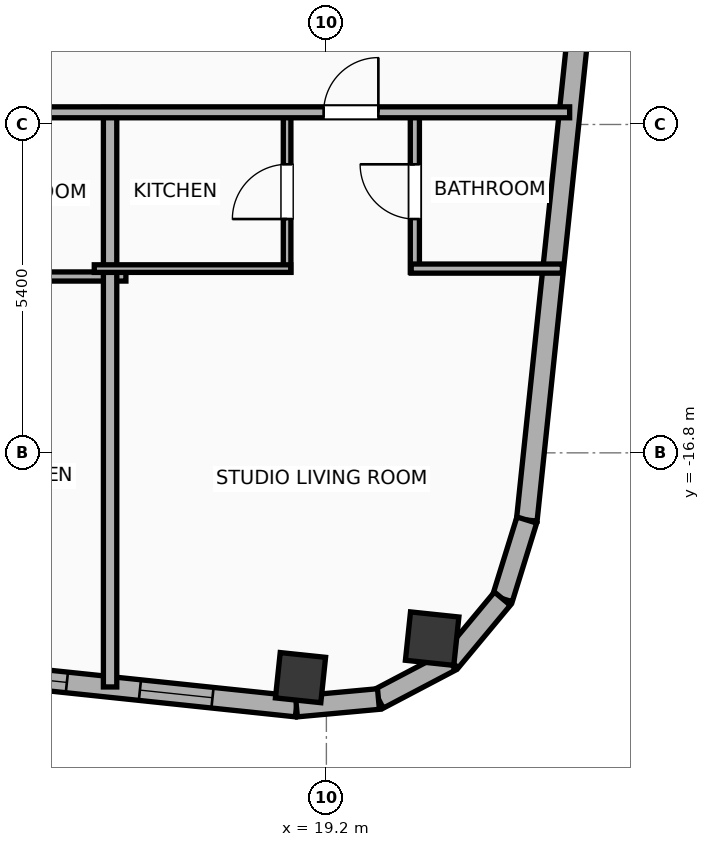
"""IFC4 building model, lengths in metres.
Left out: names, types, materials, properties, quantities, classifications, styles, units other than length and angle.
Written with IfcOpenShell. Run it as: python <this file> out.ifc"""

import sys

from ifc_helpers import new_model, si_unit, direction, frame, frame_2d, origin, origin_2d, place, context, subcontext, project, spatial, rectangle, hollow_rectangle, hollow_circle, extrude, element, fill, save


model = new_model("IFC4")
c1 = context("Model", 3, precision=1e-05, world=origin(), true_north=direction((0.0, 1.0)))
c2 = subcontext(c1, "Body", "Model", "MODEL_VIEW")
j1 = project(units=[si_unit("LENGTHUNIT", "METRE"), si_unit("PLANEANGLEUNIT", "RADIAN")], contexts=[c1])
p1 = place(None, origin())
s1 = spatial("IfcSite", under=j1, at=p1, CompositionType="ELEMENT")
p2 = place(p1, origin())
s2 = spatial("IfcBuilding", under=s1, at=p2, CompositionType="ELEMENT")
p3 = place(p2, frame((0.0, 0.0, 287.3)))
s3 = spatial("IfcBuildingStorey", under=s2, at=p3, CompositionType="ELEMENT", Elevation=287.3)
p4 = place(p3, frame((18.775, -20.497, 0.0), z_axis=(0.0, 0.0, 1.0), x_axis=(0.994521895368, -0.104528463268, 0.0)))
e1 = element("IfcColumn", 1, at=p4, inside=s3, PredefinedType="COLUMN", context=c2, shape_type="SweptSolid", body=[
    extrude(hollow_rectangle(XDim=0.75, YDim=0.75, WallThickness=0.025, at=origin_2d()), origin(), (0.0, 0.0, 1.0), 3.9),
])
p5 = place(p3, frame((20.939, -19.855, 0.0), z_axis=(0.0, 0.0, 1.0), x_axis=(0.994521895368, -0.104528463268, 0.0)))
e2 = element("IfcColumn", 2, at=p5, inside=s3, PredefinedType="COLUMN", context=c2, shape_type="SweptSolid", body=[
    extrude(hollow_circle(Radius=0.4, WallThickness=0.028, at=origin_2d()), origin(), (0.0, 0.0, 1.0), 3.9),
])
p6 = place(p3, frame((18.708, -20.972, 0.0), z_axis=(0.0, 0.0, 1.0), x_axis=(-0.994521888554, 0.104528528102, 0.0)))
e3 = element("IfcWall", 3, at=p6, inside=s3, PredefinedType="ELEMENTEDWALL", context=c2, shape_type="SweptSolid", body=[
    extrude(rectangle(XDim=46.766, YDim=0.34, at=frame_2d((23.383, 0.0))), origin(), (0.0, 0.0, 1.0), 3.635),
])
p7 = place(p6, frame((23.833, 0.0, 0.75)))
e4 = element("IfcOpeningElement", 4, at=p7, cuts=e3, PredefinedType="OPENING", context=c2, shape_type="SweptSolid", body=[
    extrude(rectangle(XDim=2.4, YDim=2.1, at=frame_2d((1.2, 1.05))), frame((0.0, 0.18, 0.0), z_axis=(0.0, -1.0, 0.0), x_axis=(1.0, 0.0, 0.0)), (0.0, 0.0, 1.0), 0.36),
])
p8 = place(p6, frame((38.622, 0.0, 0.75)))
e5 = element("IfcOpeningElement", 5, at=p8, cuts=e3, PredefinedType="OPENING", context=c2, shape_type="SweptSolid", body=[
    extrude(rectangle(XDim=2.4, YDim=2.1, at=frame_2d((1.2, 1.05))), frame((0.0, 0.18, 0.0), z_axis=(0.0, -1.0, 0.0), x_axis=(1.0, 0.0, 0.0)), (0.0, 0.0, 1.0), 0.36),
])
p9 = place(p6, frame((44.402, 0.0, 0.75)))
e6 = element("IfcOpeningElement", 6, at=p9, cuts=e3, PredefinedType="OPENING", context=c2, shape_type="SweptSolid", body=[
    extrude(rectangle(XDim=1.2, YDim=2.05, at=frame_2d((0.6, 1.025))), frame((0.0, 0.18, 0.0), z_axis=(0.0, -1.0, 0.0), x_axis=(1.0, 0.0, 0.0)), (0.0, 0.0, 1.0), 0.36),
])
p10 = place(p6, frame((42.358, 0.0, 0.75)))
e7 = element("IfcOpeningElement", 7, at=p10, cuts=e3, PredefinedType="OPENING", context=c2, shape_type="SweptSolid", body=[
    extrude(rectangle(XDim=1.2, YDim=2.05, at=frame_2d((0.6, 1.025))), frame((0.0, 0.18, 0.0), z_axis=(0.0, -1.0, 0.0), x_axis=(1.0, 0.0, 0.0)), (0.0, 0.0, 1.0), 0.36),
])
p11 = place(p6, frame((34.933, 0.0, 0.75)))
e8 = element("IfcOpeningElement", 8, at=p11, cuts=e3, PredefinedType="OPENING", context=c2, shape_type="SweptSolid", body=[
    extrude(rectangle(XDim=1.2, YDim=2.05, at=frame_2d((0.6, 1.025))), frame((0.0, 0.18, 0.0), z_axis=(0.0, -1.0, 0.0), x_axis=(1.0, 0.0, 0.0)), (0.0, 0.0, 1.0), 0.36),
])
p12 = place(p6, frame((28.704, 0.0, 0.75)))
e9 = element("IfcOpeningElement", 9, at=p12, cuts=e3, PredefinedType="OPENING", context=c2, shape_type="SweptSolid", body=[
    extrude(rectangle(XDim=1.2, YDim=2.05, at=frame_2d((0.6, 1.025))), frame((0.0, 0.18, 0.0), z_axis=(0.0, -1.0, 0.0), x_axis=(1.0, 0.0, 0.0)), (0.0, 0.0, 1.0), 0.36),
])
p13 = place(p6, frame((30.849, 0.0, 0.75)))
e10 = element("IfcOpeningElement", 10, at=p13, cuts=e3, PredefinedType="OPENING", context=c2, shape_type="SweptSolid", body=[
    extrude(rectangle(XDim=1.2, YDim=2.05, at=frame_2d((0.6, 1.025))), frame((0.0, 0.18, 0.0), z_axis=(0.0, -1.0, 0.0), x_axis=(1.0, 0.0, 0.0)), (0.0, 0.0, 1.0), 0.36),
])
p14 = place(p6, frame((7.479, 0.0, 0.75)))
e11 = element("IfcOpeningElement", 11, at=p14, cuts=e3, PredefinedType="OPENING", context=c2, shape_type="SweptSolid", body=[
    extrude(rectangle(XDim=1.2, YDim=2.05, at=frame_2d((0.6, 1.025))), frame((0.0, 0.18, 0.0), z_axis=(0.0, -1.0, 0.0), x_axis=(1.0, 0.0, 0.0)), (0.0, 0.0, 1.0), 0.36),
])
p15 = place(p6, frame((3.796, 0.0, 0.75)))
e12 = element("IfcOpeningElement", 12, at=p15, cuts=e3, PredefinedType="OPENING", context=c2, shape_type="SweptSolid", body=[
    extrude(rectangle(XDim=1.2, YDim=2.05, at=frame_2d((0.6, 1.025))), frame((0.0, 0.18, 0.0), z_axis=(0.0, -1.0, 0.0), x_axis=(1.0, 0.0, 0.0)), (0.0, 0.0, 1.0), 0.36),
])
p16 = place(p6, frame((1.388, 0.0, 0.75)))
e13 = element("IfcOpeningElement", 13, at=p16, cuts=e3, PredefinedType="OPENING", context=c2, shape_type="SweptSolid", body=[
    extrude(rectangle(XDim=1.2, YDim=2.05, at=frame_2d((0.6, 1.025))), frame((0.0, 0.18, 0.0), z_axis=(0.0, -1.0, 0.0), x_axis=(1.0, 0.0, 0.0)), (0.0, 0.0, 1.0), 0.36),
])
p17 = place(p6, frame((20.254, 0.0, 0.75)))
e14 = element("IfcOpeningElement", 14, at=p17, cuts=e3, PredefinedType="OPENING", context=c2, shape_type="SweptSolid", body=[
    extrude(rectangle(XDim=1.2, YDim=2.05, at=frame_2d((0.6, 1.025))), frame((0.0, 0.18, 0.0), z_axis=(0.0, -1.0, 0.0), x_axis=(1.0, 0.0, 0.0)), (0.0, 0.0, 1.0), 0.36),
])
p18 = place(p6, frame((16.172, 0.0, 0.75)))
e15 = element("IfcOpeningElement", 15, at=p18, cuts=e3, PredefinedType="OPENING", context=c2, shape_type="SweptSolid", body=[
    extrude(rectangle(XDim=1.2, YDim=2.05, at=frame_2d((0.6, 1.025))), frame((0.0, 0.18, 0.0), z_axis=(0.0, -1.0, 0.0), x_axis=(1.0, 0.0, 0.0)), (0.0, 0.0, 1.0), 0.36),
])
p19 = place(p6, frame((12.11, 0.0, 0.75)))
e16 = element("IfcOpeningElement", 16, at=p19, cuts=e3, PredefinedType="OPENING", context=c2, shape_type="SweptSolid", body=[
    extrude(rectangle(XDim=1.2, YDim=2.05, at=frame_2d((0.6, 1.025))), frame((0.0, 0.18, 0.0), z_axis=(0.0, -1.0, 0.0), x_axis=(1.0, 0.0, 0.0)), (0.0, 0.0, 1.0), 0.36),
])
p20 = place(p3, frame((25.67, 12.296, 0.0), z_axis=(0.0, 0.0, 1.0), x_axis=(-0.104533282919, -0.994521388791, 0.0)))
e17 = element("IfcWall", 17, at=p20, inside=s3, PredefinedType="ELEMENTEDWALL", context=c2, shape_type="SweptSolid", body=[
    extrude(rectangle(XDim=30.366, YDim=0.34, at=frame_2d((15.183, 0.0))), origin(), (0.0, 0.0, 1.0), 3.635),
])
p21 = place(p20, frame((5.842, 0.0, 0.75)))
e18 = element("IfcOpeningElement", 18, at=p21, cuts=e17, PredefinedType="OPENING", context=c2, shape_type="SweptSolid", body=[
    extrude(rectangle(XDim=1.8, YDim=2.1, at=frame_2d((0.9, 1.05))), frame((0.0, 0.18, 0.0), z_axis=(0.0, -1.0, 0.0), x_axis=(1.0, 0.0, 0.0)), (0.0, 0.0, 1.0), 0.36),
])
p22 = place(p20, frame((18.382, 0.0, 0.75)))
e19 = element("IfcOpeningElement", 19, at=p22, cuts=e17, PredefinedType="OPENING", context=c2, shape_type="SweptSolid", body=[
    extrude(rectangle(XDim=1.2, YDim=2.05, at=frame_2d((0.6, 1.025))), frame((0.0, 0.18, 0.0), z_axis=(0.0, -1.0, 0.0), x_axis=(1.0, 0.0, 0.0)), (0.0, 0.0, 1.0), 0.36),
])
p23 = place(p3, frame((22.496, -17.905, 0.0), z_axis=(0.0, 0.0, 1.0), x_axis=(-0.296416228123, -0.955058856671, 0.0)))
e20 = element("IfcWall", 20, at=p23, inside=s3, PredefinedType="ELEMENTEDWALL", context=c2, shape_type="SweptSolid", body=[
    extrude(rectangle(XDim=1.354, YDim=0.34, at=frame_2d((0.677, 0.0))), origin(), (0.0, 0.0, 1.0), 3.635),
])
p24 = place(p3, frame((22.094, -19.198, 0.0), z_axis=(0.0, 0.0, 1.0), x_axis=(-0.639501603217, -0.768789762863, 0.0)))
e21 = element("IfcWall", 21, at=p24, inside=s3, PredefinedType="ELEMENTEDWALL", context=c2, shape_type="SweptSolid", body=[
    extrude(rectangle(XDim=1.337, YDim=0.34, at=frame_2d((0.668, 0.0))), origin(), (0.0, 0.0, 1.0), 3.635),
])
p25 = place(p3, frame((21.24, -20.226, 0.0), z_axis=(0.0, 0.0, 1.0), x_axis=(-0.884922182678, -0.465738908193, 0.0)))
e22 = element("IfcWall", 22, at=p25, inside=s3, PredefinedType="ELEMENTEDWALL", context=c2, shape_type="SweptSolid", body=[
    extrude(rectangle(XDim=1.337, YDim=0.34, at=frame_2d((0.668, 0.0))), origin(), (0.0, 0.0, 1.0), 3.635),
])
p26 = place(p3, frame((20.056, -20.848, 0.0), z_axis=(0.0, 0.0, 1.0), x_axis=(-0.995813013343, -0.091413579172, 0.0)))
e23 = element("IfcWall", 23, at=p26, inside=s3, PredefinedType="ELEMENTEDWALL", context=c2, shape_type="SweptSolid", body=[
    extrude(rectangle(XDim=1.354, YDim=0.34, at=frame_2d((0.677, 0.0))), origin(), (0.0, 0.0, 1.0), 3.635),
])
p27 = place(p3, frame((12.953, -13.9, 0.0), z_axis=(0.0, 0.0, 1.0), x_axis=(1.0, 0.0, 0.0)))
e24 = element("IfcWall", 24, at=p27, inside=s3, PredefinedType="PLUMBINGWALL", context=c2, shape_type="SweptSolid", body=[
    extrude(rectangle(XDim=2.95, YDim=0.15, at=frame_2d((1.475, 0.0))), origin(), (0.0, 0.0, 1.0), 3.635),
])
p28 = place(p3, frame((15.643, -20.65, 0.0), z_axis=(0.0, 0.0, 1.0), x_axis=(0.0, 1.0, 0.0)))
e25 = element("IfcWall", 25, at=p28, inside=s3, PredefinedType="PARTITIONING", context=c2, shape_type="SweptSolid", body=[
    extrude(rectangle(XDim=9.53, YDim=0.22, at=frame_2d((4.765, 0.0))), origin(), (0.0, 0.0, 1.0), 3.635),
])
p29 = place(p3, frame((18.554, -13.83, 0.0), z_axis=(0.0, 0.0, 1.0), x_axis=(0.0, 1.0, 0.0)))
e26 = element("IfcWall", 26, at=p29, inside=s3, PredefinedType="PARTITIONING", context=c2, shape_type="SweptSolid", body=[
    extrude(rectangle(XDim=2.65, YDim=0.125, at=frame_2d((1.325, 0.0))), origin(), (0.0, 0.0, 1.0), 3.635),
])
p30 = place(p29, frame((0.875, 0.0, 0.0)))
e27 = element("IfcOpeningElement", 27, at=p30, cuts=e26, PredefinedType="OPENING", context=c2, shape_type="SweptSolid", body=[
    extrude(rectangle(XDim=0.9, YDim=2.05, at=frame_2d((0.45, 1.025))), frame((0.0, 0.073, 0.0), z_axis=(0.0, -1.0, 0.0), x_axis=(1.0, 0.0, 0.0)), (0.0, 0.0, 1.0), 0.145),
])
p31 = place(p3, frame((20.655, -13.83, 0.0), z_axis=(0.0, 0.0, 1.0), x_axis=(0.0, 1.0, 0.0)))
e28 = element("IfcWall", 28, at=p31, inside=s3, PredefinedType="PLUMBINGWALL", context=c2, shape_type="SweptSolid", body=[
    extrude(rectangle(XDim=2.65, YDim=0.15, at=frame_2d((1.325, 0.0))), origin(), (0.0, 0.0, 1.0), 3.635),
])
p32 = place(p31, frame((0.875, 0.0, 0.0)))
e29 = element("IfcOpeningElement", 29, at=p32, cuts=e28, PredefinedType="OPENING", context=c2, shape_type="SweptSolid", body=[
    extrude(rectangle(XDim=0.9, YDim=2.05, at=frame_2d((0.45, 1.025))), frame((0.0, 0.085, 0.0), z_axis=(0.0, -1.0, 0.0), x_axis=(1.0, 0.0, 0.0)), (0.0, 0.0, 1.0), 0.17),
])
p33 = place(p3, frame((15.383, -13.77, 0.0), z_axis=(0.0, 0.0, 1.0), x_axis=(1.0, 0.0, 0.0)))
e30 = element("IfcWall", 30, at=p33, inside=s3, PredefinedType="PARTITIONING", context=c2, shape_type="SweptSolid", body=[
    extrude(rectangle(XDim=3.231, YDim=0.125, at=frame_2d((1.615, 0.0))), origin(), (0.0, 0.0, 1.0), 3.635),
])
p34 = place(p3, frame((20.595, -13.77, 0.0), z_axis=(0.0, 0.0, 1.0), x_axis=(1.0, 0.0, 0.0)))
e31 = element("IfcWall", 31, at=p34, inside=s3, PredefinedType="PLUMBINGWALL", context=c2, shape_type="SweptSolid", body=[
    extrude(rectangle(XDim=2.486, YDim=0.15, at=frame_2d((1.243, 0.0))), origin(), (0.0, 0.0, 1.0), 3.635),
])
p35 = place(p3, frame((8.08, -11.2, 0.0), z_axis=(0.0, 0.0, 1.0), x_axis=(1.0, 0.0, 0.0)))
e32 = element("IfcWall", 32, at=p35, inside=s3, PredefinedType="PARTITIONING", context=c2, shape_type="SweptSolid", body=[
    extrude(rectangle(XDim=15.121, YDim=0.18, at=frame_2d((7.56, 0.0))), origin(), (0.0, 0.0, 1.0), 3.635),
])
p36 = place(p35, frame((1.932, 0.0, 0.0)))
e33 = element("IfcOpeningElement", 33, at=p36, cuts=e32, PredefinedType="OPENING", context=c2, shape_type="SweptSolid", body=[
    extrude(rectangle(XDim=1.15, YDim=2.05, at=frame_2d((0.575, 1.025))), frame((0.0, 0.1, 0.0), z_axis=(0.0, -1.0, 0.0), x_axis=(1.0, 0.0, 0.0)), (0.0, 0.0, 1.0), 0.2),
])
p37 = place(p35, frame((11.075, 0.0, 0.0)))
e34 = element("IfcOpeningElement", 34, at=p37, cuts=e32, PredefinedType="OPENING", context=c2, shape_type="SweptSolid", body=[
    extrude(rectangle(XDim=0.9, YDim=2.05, at=frame_2d((0.45, 1.025))), frame((0.0, 0.1, 0.0), z_axis=(0.0, -1.0, 0.0), x_axis=(1.0, 0.0, 0.0)), (0.0, 0.0, 1.0), 0.2),
])
p38 = place(p15, origin())
e35 = element("IfcWindow", 35, at=p38, inside=s3, PartitioningType="SINGLE_PANEL", PredefinedType="WINDOW", context=c2, shape_type="SweptSolid", body=[
    extrude(rectangle(XDim=1.2, YDim=2.05, at=frame_2d((0.6, 1.025))), frame((0.0, 0.03, 0.0), z_axis=(0.0, -1.0, 0.0), x_axis=(1.0, 0.0, 0.0)), (0.0, 0.0, 1.0), 0.06),
])
fill(e12, e35)
p39 = place(p16, origin())
e36 = element("IfcWindow", 36, at=p39, inside=s3, PartitioningType="SINGLE_PANEL", PredefinedType="WINDOW", context=c2, shape_type="SweptSolid", body=[
    extrude(rectangle(XDim=1.2, YDim=2.05, at=frame_2d((0.6, 1.025))), frame((0.0, 0.03, 0.0), z_axis=(0.0, -1.0, 0.0), x_axis=(1.0, 0.0, 0.0)), (0.0, 0.0, 1.0), 0.06),
])
fill(e13, e36)
p40 = place(p30, origin())
e37 = element("IfcDoor", 37, at=p40, inside=s3, OperationType="SINGLE_SWING_LEFT", PredefinedType="DOOR", context=c2, shape_type="SweptSolid", body=[
    extrude(rectangle(XDim=0.9, YDim=2.05, at=frame_2d((0.45, 1.025))), frame((0.0, 0.025, 0.0), z_axis=(0.0, -1.0, 0.0), x_axis=(1.0, 0.0, 0.0)), (0.0, 0.0, 1.0), 0.05),
])
fill(e27, e37)
p41 = place(p32, origin())
e38 = element("IfcDoor", 38, at=p41, inside=s3, OperationType="SINGLE_SWING_RIGHT", PredefinedType="DOOR", context=c2, shape_type="SweptSolid", body=[
    extrude(rectangle(XDim=0.9, YDim=2.05, at=frame_2d((0.45, 1.025))), frame((0.0, 0.025, 0.0), z_axis=(0.0, -1.0, 0.0), x_axis=(1.0, 0.0, 0.0)), (0.0, 0.0, 1.0), 0.05),
])
fill(e29, e38)
p42 = place(p37, origin())
e39 = element("IfcDoor", 39, at=p42, inside=s3, OperationType="SINGLE_SWING_RIGHT", PredefinedType="DOOR", context=c2, shape_type="SweptSolid", body=[
    extrude(rectangle(XDim=0.9, YDim=2.05, at=frame_2d((0.45, 1.025))), frame((0.0, 0.025, 0.0), z_axis=(0.0, -1.0, 0.0), x_axis=(1.0, 0.0, 0.0)), (0.0, 0.0, 1.0), 0.05),
])
fill(e34, e39)
save(model, sys.argv[1])
